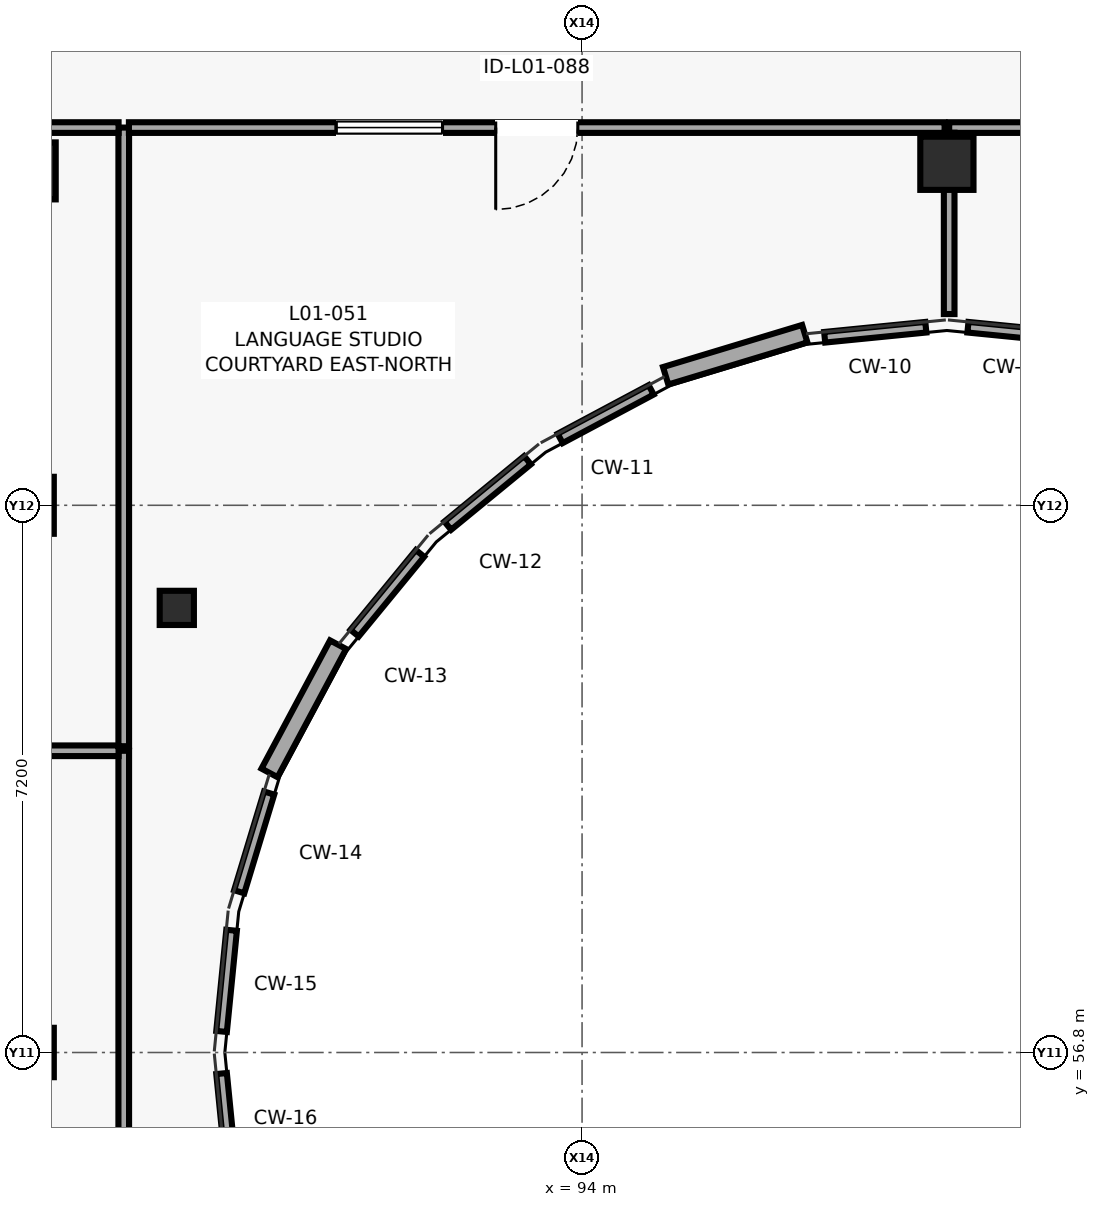
"""IFC4 building model, lengths in metres.
Left out: names, types, materials, properties, quantities, classifications, styles, units other than length and angle.
Written with IfcOpenShell. Run it as: python <this file> out.ifc"""

import sys

from ifc_helpers import new_model, si_unit, direction, frame, frame_2d, origin, origin_2d, place, context, subcontext, project, spatial, rectangle, circle, extrude, element, fill, save


model = new_model("IFC4")
c1 = context("Model", 3, precision=1e-05, world=origin(), true_north=direction((0.0, 1.0)))
c2 = subcontext(c1, "Body", "Model", "MODEL_VIEW")
j1 = project(units=[si_unit("LENGTHUNIT", "METRE"), si_unit("PLANEANGLEUNIT", "RADIAN")], contexts=[c1])
p1 = place(None, origin())
s1 = spatial("IfcSite", under=j1, at=p1, CompositionType="ELEMENT")
p2 = place(p1, origin())
s2 = spatial("IfcBuilding", under=s1, at=p2, CompositionType="ELEMENT")
p3 = place(p2, frame((0.0, 0.0, 4.2)))
s3 = spatial("IfcBuildingStorey", under=s2, at=p3, CompositionType="ELEMENT", Elevation=4.2)
p4 = place(p3, frame((86.8, 56.8, 0.0), z_axis=(0.0, 0.0, 1.0), x_axis=(1.0, 0.0, 0.0)))
e1 = element("IfcColumn", 1, at=p4, inside=s3, PredefinedType="COLUMN", context=c2, shape_type="SweptSolid", body=[
    extrude(rectangle(XDim=0.5, YDim=0.65, at=origin_2d()), origin(), (0.0, 0.0, 1.0), 4.0),
])
p5 = place(p3, frame((86.8, 64.0, 0.0), z_axis=(0.0, 0.0, 1.0), x_axis=(1.0, 0.0, 0.0)))
e2 = element("IfcColumn", 2, at=p5, inside=s3, PredefinedType="COLUMN", context=c2, shape_type="SweptSolid", body=[
    extrude(rectangle(XDim=0.5, YDim=0.75, at=origin_2d()), origin(), (0.0, 0.0, 1.0), 4.0),
])
p6 = place(p3, frame((86.8, 68.4, 0.0), z_axis=(0.0, 0.0, 1.0), x_axis=(1.0, 0.0, 0.0)))
e3 = element("IfcColumn", 3, at=p6, inside=s3, PredefinedType="COLUMN", context=c2, shape_type="SweptSolid", body=[
    extrude(rectangle(XDim=0.55, YDim=0.75, at=origin_2d()), origin(), (0.0, 0.0, 1.0), 4.0),
])
p7 = place(p3, frame((88.668, 62.65, 0.0), z_axis=(0.0, 0.0, 1.0), x_axis=(1.0, 0.0, 0.0)))
e4 = element("IfcColumn", 4, at=p7, inside=s3, PredefinedType="COLUMN", context=c2, shape_type="SweptSolid", body=[
    extrude(circle(Radius=0.225, at=origin_2d()), origin(), (0.0, 0.0, 1.0), 4.0),
])
p8 = place(p3, frame((98.8, 68.5, 0.0), z_axis=(0.0, 0.0, 1.0), x_axis=(1.0, 0.0, 0.0)))
e5 = element("IfcColumn", 5, at=p8, inside=s3, PredefinedType="COLUMN", context=c2, shape_type="SweptSolid", body=[
    extrude(circle(Radius=0.35, at=origin_2d()), origin(), (0.0, 0.0, 1.0), 4.0),
])
p9 = place(p3, frame((96.93, 66.258, 0.0), z_axis=(0.0, 0.0, 1.0), x_axis=(-0.957102771605, -0.289748657608, 0.0)))
e6 = element("IfcWall", 6, at=p9, inside=s3, PredefinedType="SOLIDWALL", context=c2, shape_type="SweptSolid", body=[
    extrude(rectangle(XDim=1.912, YDim=0.24, at=frame_2d((0.956, 0.0))), origin(), (0.0, 0.0, 1.0), 3.78),
])
p10 = place(p3, frame((90.79, 62.166, 0.0), z_axis=(0.0, 0.0, 1.0), x_axis=(-0.471548403175, -0.881840180227, 0.0)))
e7 = element("IfcWall", 7, at=p10, inside=s3, PredefinedType="SOLIDWALL", context=c2, shape_type="SweptSolid", body=[
    extrude(rectangle(XDim=1.913, YDim=0.24, at=frame_2d((0.957, 0.0))), origin(), (0.0, 0.0, 1.0), 3.78),
])
p11 = place(p3, frame((87.97, 52.83, 0.0), z_axis=(0.0, 0.0, 1.0), x_axis=(0.0, 1.0, 0.0)))
e8 = element("IfcWall", 8, at=p11, inside=s3, PredefinedType="PARTITIONING", context=c2, shape_type="SweptSolid", body=[
    extrude(rectangle(XDim=7.94, YDim=0.14, at=frame_2d((3.97, 0.0))), origin(), (0.0, 0.0, 1.0), 3.775),
])
p12 = place(p3, frame((87.902, 60.77, 0.0), z_axis=(0.0, 0.0, 1.0), x_axis=(-1.0, 0.0, 0.0)))
e9 = element("IfcWall", 9, at=p12, inside=s3, PredefinedType="PARTITIONING", context=c2, shape_type="SweptSolid", body=[
    extrude(rectangle(XDim=8.372, YDim=0.14, at=frame_2d((4.186, 0.0))), origin(), (0.0, 0.0, 1.0), 3.775),
])
p13 = place(p3, frame((87.97, 60.83, 0.0), z_axis=(0.0, 0.0, 1.0), x_axis=(0.0, 1.0, 0.0)))
e10 = element("IfcWall", 10, at=p13, inside=s3, PredefinedType="PARTITIONING", context=c2, shape_type="SweptSolid", body=[
    extrude(rectangle(XDim=8.14, YDim=0.14, at=frame_2d((4.07, 0.0))), origin(), (0.0, 0.0, 1.0), 3.775),
])
p14 = place(p3, frame((87.902, 68.97, 0.0), z_axis=(0.0, 0.0, 1.0), x_axis=(-1.0, 0.0, 0.0)))
e11 = element("IfcWall", 11, at=p14, inside=s3, PredefinedType="PARTITIONING", context=c2, shape_type="SweptSolid", body=[
    extrude(rectangle(XDim=8.372, YDim=0.14, at=frame_2d((4.186, 0.0))), origin(), (0.0, 0.0, 1.0), 3.775),
])
p15 = place(p14, frame((3.646, 0.0, 0.0)))
e12 = element("IfcOpeningElement", 12, at=p15, cuts=e11, PredefinedType="OPENING", context=c2, shape_type="SweptSolid", body=[
    extrude(rectangle(XDim=1.08, YDim=2.16, at=frame_2d((0.54, 1.08))), frame((0.0, 0.08, 0.0), z_axis=(0.0, -1.0, 0.0), x_axis=(1.0, 0.0, 0.0)), (0.0, 0.0, 1.0), 0.16),
])
p16 = place(p14, frame((5.426, 0.0, 1.05)))
e13 = element("IfcOpeningElement", 13, at=p16, cuts=e11, PredefinedType="OPENING", context=c2, shape_type="SweptSolid", body=[
    extrude(rectangle(XDim=1.6, YDim=1.1, at=frame_2d((0.8, 0.55))), frame((0.0, 0.08, 0.0), z_axis=(0.0, -1.0, 0.0), x_axis=(1.0, 0.0, 0.0)), (0.0, 0.0, 1.0), 0.16),
])
p17 = place(p3, frame((112.97, 68.97, 0.0), z_axis=(0.0, 0.0, 1.0), x_axis=(-1.0, 0.0, 0.0)))
e14 = element("IfcWall", 14, at=p17, inside=s3, PredefinedType="PARTITIONING", context=c2, shape_type="SweptSolid", body=[
    extrude(rectangle(XDim=14.14, YDim=0.14, at=frame_2d((7.07, 0.0))), origin(), (0.0, 0.0, 1.0), 3.775),
])
p18 = place(p17, frame((6.58, 0.0, 0.0)))
e15 = element("IfcOpeningElement", 15, at=p18, cuts=e14, PredefinedType="OPENING", context=c2, shape_type="SweptSolid", body=[
    extrude(rectangle(XDim=0.98, YDim=2.12, at=frame_2d((0.49, 1.06))), frame((0.0, 0.08, 0.0), z_axis=(0.0, -1.0, 0.0), x_axis=(1.0, 0.0, 0.0)), (0.0, 0.0, 1.0), 0.16),
])
p19 = place(p17, frame((8.26, 0.0, 1.05)))
e16 = element("IfcOpeningElement", 16, at=p19, cuts=e14, PredefinedType="OPENING", context=c2, shape_type="SweptSolid", body=[
    extrude(rectangle(XDim=1.6, YDim=1.1, at=frame_2d((0.8, 0.55))), frame((0.0, 0.08, 0.0), z_axis=(0.0, -1.0, 0.0), x_axis=(1.0, 0.0, 0.0)), (0.0, 0.0, 1.0), 0.16),
])
p20 = place(p3, frame((98.83, 68.902, 0.0), z_axis=(0.0, 0.0, 1.0), x_axis=(0.0, -1.0, 0.0)))
e17 = element("IfcWall", 17, at=p20, inside=s3, PredefinedType="PARTITIONING", context=c2, shape_type="SweptSolid", body=[
    extrude(rectangle(XDim=2.386, YDim=0.14, at=frame_2d((1.193, 0.0))), origin(), (0.0, 0.0, 1.0), 3.775),
])
for number, where, z_axis, x_axis in (
    (18, (99.077, 66.343, 0.0), (0.0, 0.0, 1.0), (0.995, -0.099, 0.0)),
    (19, (89.389, 55.192, 0.0), (0.0, 0.0, 1.0), (-0.099, 0.995, 0.0)),
    (20, (89.257, 57.077, 0.0), (0.0, 0.0, 1.0), (0.099, 0.995, 0.0)),
):
    element("IfcWall", number, at=place(p3, frame(where, z_axis=z_axis, x_axis=x_axis)), inside=s3, PredefinedType="PARTITIONING", context=c2, shape_type="SweptSolid", body=[
        extrude(rectangle(XDim=1.338, YDim=0.14, at=frame_2d((0.669, 0.0))), origin(), (0.0, 0.0, 1.0), 3.775),
    ])
p21 = place(p3, frame((89.489, 58.915, 0.0), z_axis=(0.0, 0.0, 1.0), x_axis=(0.290266939661, 0.956945716193, 0.0)))
e21 = element("IfcWall", 21, at=p21, inside=s3, PredefinedType="PARTITIONING", context=c2, shape_type="SweptSolid", body=[
    extrude(rectangle(XDim=1.357, YDim=0.14, at=frame_2d((0.679, 0.0))), origin(), (0.0, 0.0, 1.0), 3.775),
])
p22 = place(p3, frame((91.007, 62.318, 0.0), z_axis=(0.0, 0.0, 1.0), x_axis=(0.634432410055, 0.772978341916, 0.0)))
e22 = element("IfcWall", 22, at=p22, inside=s3, PredefinedType="PARTITIONING", context=c2, shape_type="SweptSolid", body=[
    extrude(rectangle(XDim=1.357, YDim=0.14, at=frame_2d((0.678, 0.0))), origin(), (0.0, 0.0, 1.0), 3.775),
])
p23 = place(p3, frame((92.233, 63.732, 0.0), z_axis=(0.0, 0.0, 1.0), x_axis=(0.772962530207, 0.634451674201, 0.0)))
e23 = element("IfcWall", 23, at=p23, inside=s3, PredefinedType="PARTITIONING", context=c2, shape_type="SweptSolid", body=[
    extrude(rectangle(XDim=1.357, YDim=0.14, at=frame_2d((0.679, 0.0))), origin(), (0.0, 0.0, 1.0), 3.775),
])
p24 = place(p3, frame((93.712, 64.88, 0.0), z_axis=(0.0, 0.0, 1.0), x_axis=(0.882123740571, 0.471017734614, 0.0)))
e24 = element("IfcWall", 24, at=p24, inside=s3, PredefinedType="PARTITIONING", context=c2, shape_type="SweptSolid", body=[
    extrude(rectangle(XDim=1.357, YDim=0.14, at=frame_2d((0.678, 0.0))), origin(), (0.0, 0.0, 1.0), 3.775),
])
p25 = place(p3, frame((97.192, 66.211, 0.0), z_axis=(0.0, 0.0, 1.0), x_axis=(0.995112801185, 0.098744685517, 0.0)))
e25 = element("IfcWall", 25, at=p25, inside=s3, PredefinedType="PARTITIONING", context=c2, shape_type="SweptSolid", body=[
    extrude(rectangle(XDim=1.338, YDim=0.14, at=frame_2d((0.669, 0.0))), origin(), (0.0, 0.0, 1.0), 3.775),
])
p26 = place(p3, frame((98.77, 68.97, 0.0), z_axis=(0.0, 0.0, 1.0), x_axis=(-1.0, 0.0, 0.0)))
e26 = element("IfcWall", 26, at=p26, inside=s3, PredefinedType="PARTITIONING", context=c2, shape_type="SweptSolid", body=[
    extrude(rectangle(XDim=10.732, YDim=0.14, at=frame_2d((5.366, 0.0))), origin(), (0.0, 0.0, 1.0), 3.775),
])
p27 = place(p26, frame((4.826, 0.0, 0.0)))
e27 = element("IfcOpeningElement", 27, at=p27, cuts=e26, PredefinedType="OPENING", context=c2, shape_type="SweptSolid", body=[
    extrude(rectangle(XDim=1.08, YDim=2.16, at=frame_2d((0.54, 1.08))), frame((0.0, 0.08, 0.0), z_axis=(0.0, -1.0, 0.0), x_axis=(1.0, 0.0, 0.0)), (0.0, 0.0, 1.0), 0.16),
])
p28 = place(p26, frame((6.606, 0.0, 1.05)))
e28 = element("IfcOpeningElement", 28, at=p28, cuts=e26, PredefinedType="OPENING", context=c2, shape_type="SweptSolid", body=[
    extrude(rectangle(XDim=1.4, YDim=1.05, at=frame_2d((0.7, 0.525))), frame((0.0, 0.08, 0.0), z_axis=(0.0, -1.0, 0.0), x_axis=(1.0, 0.0, 0.0)), (0.0, 0.0, 1.0), 0.16),
])
p29 = place(p27, origin())
e29 = element("IfcDoor", 29, at=p29, inside=s3, OperationType="SINGLE_SWING_RIGHT", PredefinedType="DOOR", context=c2, shape_type="SweptSolid", body=[
    extrude(rectangle(XDim=1.08, YDim=2.16, at=frame_2d((0.54, 1.08))), frame((0.0, 0.025, 0.0), z_axis=(0.0, -1.0, 0.0), x_axis=(1.0, 0.0, 0.0)), (0.0, 0.0, 1.0), 0.05),
])
fill(e27, e29)
p30 = place(p28, origin())
e30 = element("IfcWindow", 30, at=p30, inside=s3, PartitioningType="SINGLE_PANEL", PredefinedType="WINDOW", context=c2, shape_type="SweptSolid", body=[
    extrude(rectangle(XDim=1.4, YDim=1.05, at=frame_2d((0.7, 0.525))), frame((0.0, 0.03, 0.0), z_axis=(0.0, -1.0, 0.0), x_axis=(1.0, 0.0, 0.0)), (0.0, 0.0, 1.0), 0.06),
])
fill(e28, e30)
save(model, sys.argv[1])
